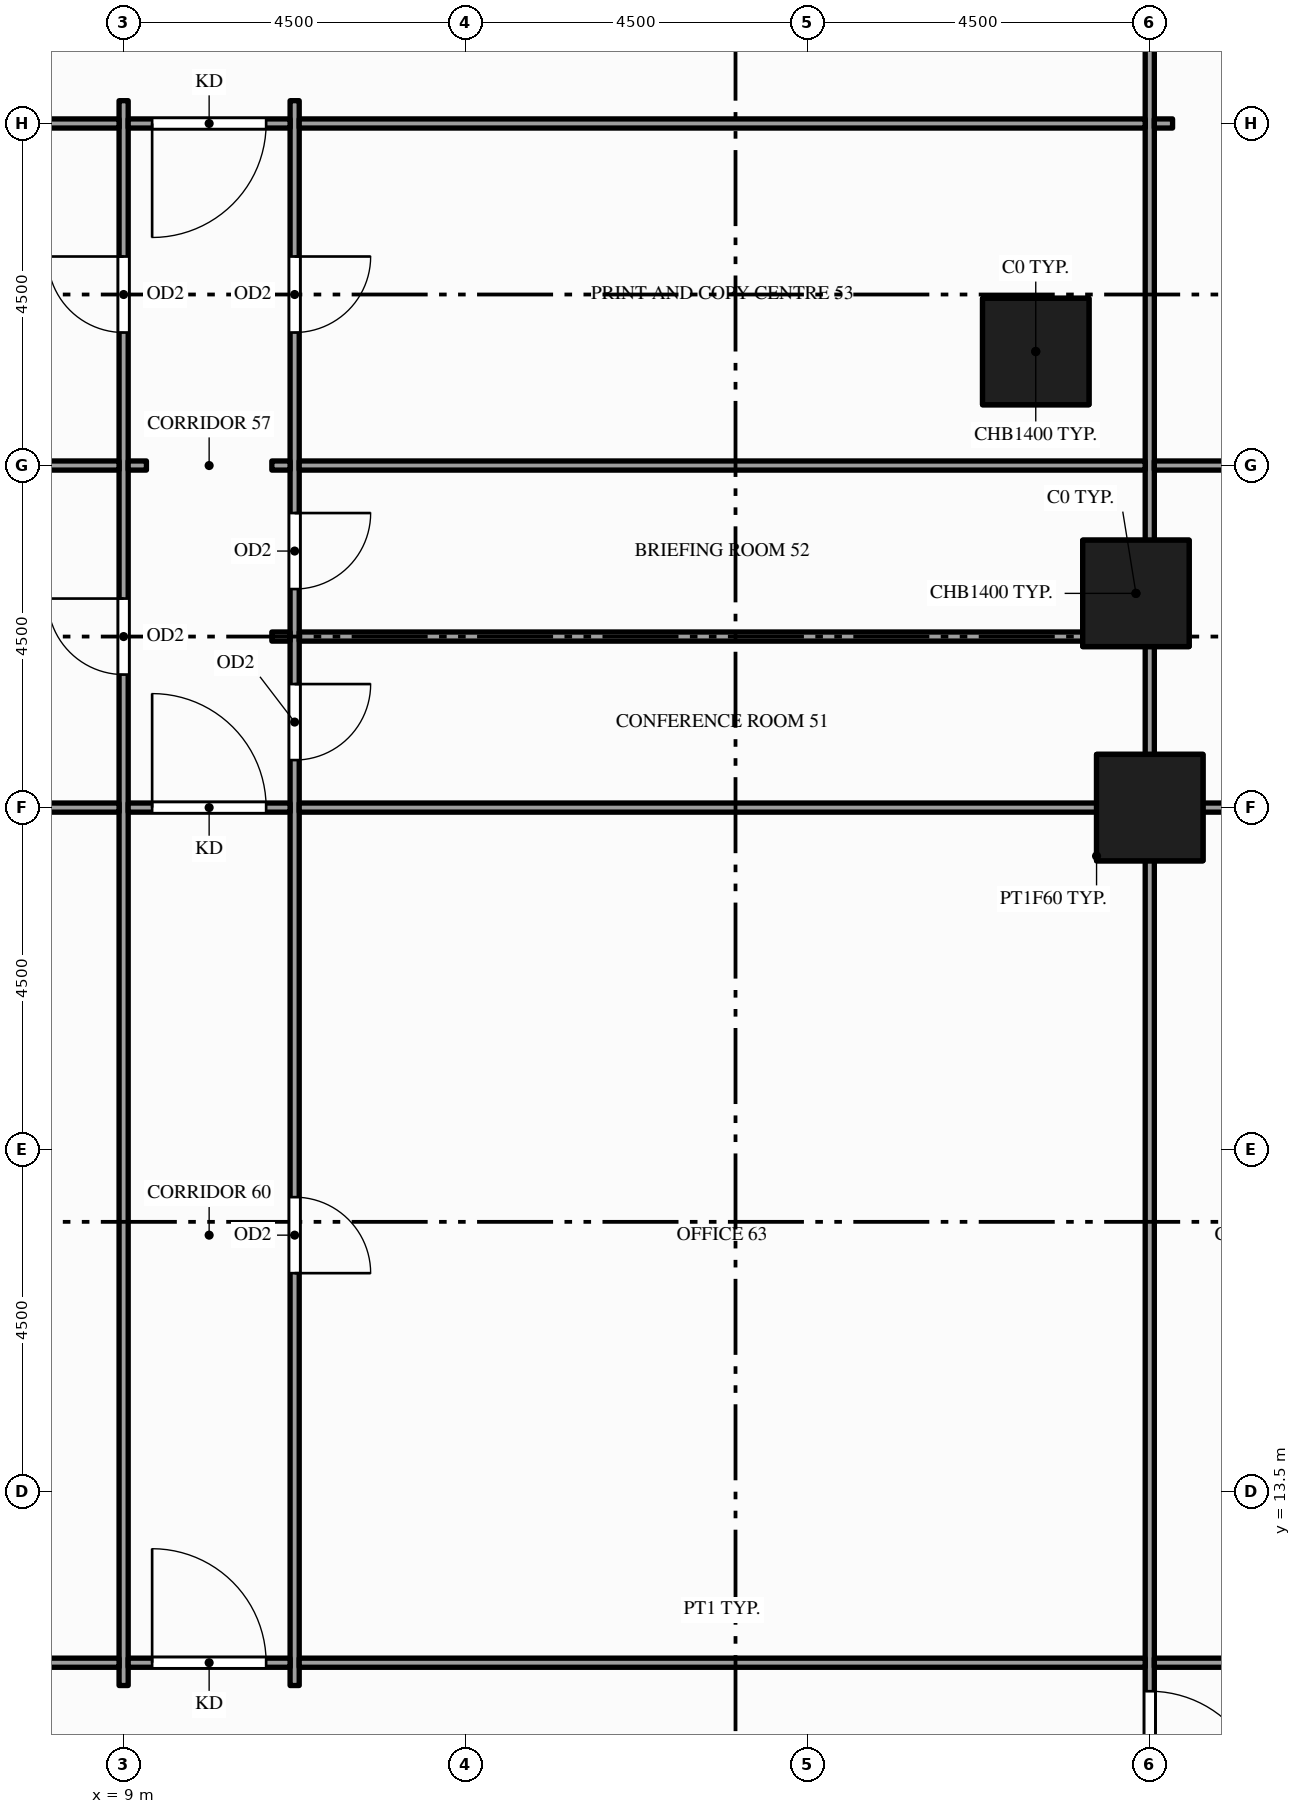
"""IFC4 building model, lengths in metres.
Left out: names, types, materials, properties, quantities, classifications, styles, units other than length and angle.
Written with IfcOpenShell. Run it as: python <this file> out.ifc"""

import sys

from ifc_helpers import new_model, si_unit, direction, frame, frame_2d, origin, origin_2d, place, context, subcontext, project, spatial, rectangle, hollow_rectangle, extrude, element, fill, save


model = new_model("IFC4")
c1 = context("Model", 3, precision=1e-05, world=origin(), true_north=direction((0.0, 1.0)))
c2 = subcontext(c1, "Body", "Model", "MODEL_VIEW")
j1 = project(units=[si_unit("LENGTHUNIT", "METRE"), si_unit("PLANEANGLEUNIT", "RADIAN")], contexts=[c1])
p1 = place(None, origin())
s1 = spatial("IfcSite", under=j1, at=p1, CompositionType="ELEMENT")
p2 = place(p1, origin())
s2 = spatial("IfcBuilding", under=s1, at=p2, CompositionType="ELEMENT")
p3 = place(p2, frame((0.0, 0.0, 24.0)))
s3 = spatial("IfcBuildingStorey", under=s2, at=p3, CompositionType="ELEMENT", Elevation=24.0)
p4 = place(p3, frame((21.0, 28.5, -0.25), z_axis=(0.0, 0.0, 1.0), x_axis=(1.0, 0.0, 0.0)))
e1 = element("IfcColumn", 1, at=p4, inside=s3, PredefinedType="COLUMN", context=c2, shape_type="SweptSolid", body=[
    extrude(hollow_rectangle(XDim=1.4, YDim=1.4, WallThickness=0.08, at=origin_2d()), origin(), (0.0, 0.0, 1.0), 3.45),
])
p5 = place(p3, frame((21.0, 28.5, 3.2), z_axis=(0.0, 0.0, 1.0), x_axis=(1.0, 0.0, 0.0)))
e2 = element("IfcColumn", 2, at=p5, inside=s3, PredefinedType="COLUMN", context=c2, shape_type="SweptSolid", body=[
    extrude(rectangle(XDim=1.4, YDim=1.4, at=origin_2d()), origin(), (0.0, 0.0, 1.0), 1.5),
])
p6 = place(p3, frame((22.318, 25.318, -0.25), z_axis=(0.0, 0.0, 1.0), x_axis=(1.0, 0.0, 0.0)))
e3 = element("IfcColumn", 3, at=p6, inside=s3, PredefinedType="COLUMN", context=c2, shape_type="SweptSolid", body=[
    extrude(hollow_rectangle(XDim=1.4, YDim=1.4, WallThickness=0.08, at=origin_2d()), origin(), (0.0, 0.0, 1.0), 3.45),
])
p7 = place(p3, frame((22.318, 25.318, 3.2), z_axis=(0.0, 0.0, 1.0), x_axis=(1.0, 0.0, 0.0)))
e4 = element("IfcColumn", 4, at=p7, inside=s3, PredefinedType="COLUMN", context=c2, shape_type="SweptSolid", body=[
    extrude(rectangle(XDim=1.4, YDim=1.4, at=origin_2d()), origin(), (0.0, 0.0, 1.0), 1.5),
])
p8 = place(p3, frame((22.5, 22.5, -0.25), z_axis=(0.0, 0.0, 1.0), x_axis=(1.0, 0.0, 0.0)))
e5 = element("IfcColumn", 5, at=p8, inside=s3, PredefinedType="COLUMN", context=c2, shape_type="SweptSolid", body=[
    extrude(hollow_rectangle(XDim=1.4, YDim=1.4, WallThickness=0.08, at=origin_2d()), origin(), (0.0, 0.0, 1.0), 3.6),
])
p9 = place(p3, frame((22.5, 22.5, 3.35), z_axis=(0.0, 0.0, 1.0), x_axis=(1.0, 0.0, 0.0)))
e6 = element("IfcColumn", 6, at=p9, inside=s3, PredefinedType="COLUMN", context=c2, shape_type="SweptSolid", body=[
    extrude(rectangle(XDim=1.4, YDim=1.4, at=origin_2d()), origin(), (0.0, 0.0, 1.0), 1.5),
])
p10 = place(p3, frame((9.0, 10.95, 0.0), z_axis=(0.0, 0.0, 1.0), x_axis=(0.0, 1.0, 0.0)))
e7 = element("IfcWall", 7, at=p10, inside=s3, PredefinedType="PARTITIONING", context=c2, shape_type="SweptSolid", body=[
    extrude(rectangle(XDim=20.85, YDim=0.12, at=frame_2d((10.425, 0.0))), origin(), (0.0, 0.0, 1.0), 3.6),
])
p11 = place(p10, frame((13.3, 0.0, 0.0)))
e8 = element("IfcOpeningElement", 8, at=p11, cuts=e7, PredefinedType="OPENING", context=c2, shape_type="SweptSolid", body=[
    extrude(rectangle(XDim=1.0, YDim=2.1, at=frame_2d((0.5, 1.05))), frame((0.0, 0.07, 0.0), z_axis=(0.0, -1.0, 0.0), x_axis=(1.0, 0.0, 0.0)), (0.0, 0.0, 1.0), 0.14),
])
p12 = place(p10, frame((17.8, 0.0, 0.0)))
e9 = element("IfcOpeningElement", 9, at=p12, cuts=e7, PredefinedType="OPENING", context=c2, shape_type="SweptSolid", body=[
    extrude(rectangle(XDim=1.0, YDim=2.1, at=frame_2d((0.5, 1.05))), frame((0.0, 0.07, 0.0), z_axis=(0.0, -1.0, 0.0), x_axis=(1.0, 0.0, 0.0)), (0.0, 0.0, 1.0), 0.14),
])
p13 = place(p3, frame((11.25, 10.95, 0.0), z_axis=(0.0, 0.0, 1.0), x_axis=(0.0, 1.0, 0.0)))
e10 = element("IfcWall", 10, at=p13, inside=s3, PredefinedType="PARTITIONING", context=c2, shape_type="SweptSolid", body=[
    extrude(rectangle(XDim=20.85, YDim=0.12, at=frame_2d((10.425, 0.0))), origin(), (0.0, 0.0, 1.0), 3.6),
])
p14 = place(p13, frame((5.425, 0.0, 0.0)))
e11 = element("IfcOpeningElement", 11, at=p14, cuts=e10, PredefinedType="OPENING", context=c2, shape_type="SweptSolid", body=[
    extrude(rectangle(XDim=1.0, YDim=2.1, at=frame_2d((0.5, 1.05))), frame((0.0, 0.07, 0.0), z_axis=(0.0, -1.0, 0.0), x_axis=(1.0, 0.0, 0.0)), (0.0, 0.0, 1.0), 0.14),
])
p15 = place(p13, frame((12.175, 0.0, 0.0)))
e12 = element("IfcOpeningElement", 12, at=p15, cuts=e10, PredefinedType="OPENING", context=c2, shape_type="SweptSolid", body=[
    extrude(rectangle(XDim=1.0, YDim=2.1, at=frame_2d((0.5, 1.05))), frame((0.0, 0.07, 0.0), z_axis=(0.0, -1.0, 0.0), x_axis=(1.0, 0.0, 0.0)), (0.0, 0.0, 1.0), 0.14),
])
p16 = place(p13, frame((14.425, 0.0, 0.0)))
e13 = element("IfcOpeningElement", 13, at=p16, cuts=e10, PredefinedType="OPENING", context=c2, shape_type="SweptSolid", body=[
    extrude(rectangle(XDim=1.0, YDim=2.1, at=frame_2d((0.5, 1.05))), frame((0.0, 0.07, 0.0), z_axis=(0.0, -1.0, 0.0), x_axis=(1.0, 0.0, 0.0)), (0.0, 0.0, 1.0), 0.14),
])
p17 = place(p13, frame((17.8, 0.0, 0.0)))
e14 = element("IfcOpeningElement", 14, at=p17, cuts=e10, PredefinedType="OPENING", context=c2, shape_type="SweptSolid", body=[
    extrude(rectangle(XDim=1.0, YDim=2.1, at=frame_2d((0.5, 1.05))), frame((0.0, 0.07, 0.0), z_axis=(0.0, -1.0, 0.0), x_axis=(1.0, 0.0, 0.0)), (0.0, 0.0, 1.0), 0.14),
])
p18 = place(p3, frame((22.5, 0.15, 0.0), z_axis=(0.0, 0.0, 1.0), x_axis=(0.0, 1.0, 0.0)))
e15 = element("IfcWall", 15, at=p18, inside=s3, PredefinedType="PARTITIONING", context=c2, shape_type="SweptSolid", body=[
    extrude(rectangle(XDim=35.95, YDim=0.12, at=frame_2d((17.975, 0.0))), origin(), (0.0, 0.0, 1.0), 3.3),
])
p19 = place(p18, frame((9.225, 0.0, 0.0)))
e16 = element("IfcOpeningElement", 16, at=p19, cuts=e15, PredefinedType="OPENING", context=c2, shape_type="SweptSolid", body=[
    extrude(rectangle(XDim=1.5, YDim=2.1, at=frame_2d((0.75, 1.05))), frame((0.0, 0.07, 0.0), z_axis=(0.0, -1.0, 0.0), x_axis=(1.0, 0.0, 0.0)), (0.0, 0.0, 1.0), 0.14),
])
p20 = place(p18, frame((32.7, 0.0, 0.0)))
e17 = element("IfcOpeningElement", 17, at=p20, cuts=e15, PredefinedType="OPENING", context=c2, shape_type="SweptSolid", body=[
    extrude(rectangle(XDim=1.8, YDim=2.1, at=frame_2d((0.9, 1.05))), frame((0.0, 0.07, 0.0), z_axis=(0.0, -1.0, 0.0), x_axis=(1.0, 0.0, 0.0)), (0.0, 0.0, 1.0), 0.14),
])
p21 = place(p3, frame((0.15, 11.25, 0.0), z_axis=(0.0, 0.0, 1.0), x_axis=(1.0, 0.0, 0.0)))
e18 = element("IfcWall", 18, at=p21, inside=s3, PredefinedType="PARTITIONING", context=c2, shape_type="SweptSolid", body=[
    extrude(rectangle(XDim=8.79, YDim=0.12, at=frame_2d((4.395, 0.0))), origin(), (0.0, 0.0, 1.0), 3.938),
])
p22 = place(p21, frame((3.905, 0.0, 0.0)))
e19 = element("IfcOpeningElement", 19, at=p22, cuts=e18, PredefinedType="OPENING", context=c2, shape_type="SweptSolid", body=[
    extrude(rectangle(XDim=1.0, YDim=2.1, at=frame_2d((0.5, 1.05))), frame((0.0, 0.07, 0.0), z_axis=(0.0, -1.0, 0.0), x_axis=(1.0, 0.0, 0.0)), (0.0, 0.0, 1.0), 0.14),
])
p23 = place(p3, frame((9.06, 11.25, 0.0), z_axis=(0.0, 0.0, 1.0), x_axis=(1.0, 0.0, 0.0)))
e20 = element("IfcWall", 20, at=p23, inside=s3, PredefinedType="PARTITIONING", context=c2, shape_type="SweptSolid", body=[
    extrude(rectangle(XDim=2.13, YDim=0.12, at=frame_2d((1.065, 0.0))), origin(), (0.0, 0.0, 1.0), 3.938),
])
p24 = place(p23, frame((0.315, 0.0, 0.0)))
e21 = element("IfcOpeningElement", 21, at=p24, cuts=e20, PredefinedType="OPENING", context=c2, shape_type="SweptSolid", body=[
    extrude(rectangle(XDim=1.5, YDim=2.1, at=frame_2d((0.75, 1.05))), frame((0.0, 0.07, 0.0), z_axis=(0.0, -1.0, 0.0), x_axis=(1.0, 0.0, 0.0)), (0.0, 0.0, 1.0), 0.14),
])
p25 = place(p3, frame((11.31, 11.25, 0.0), z_axis=(0.0, 0.0, 1.0), x_axis=(1.0, 0.0, 0.0)))
e22 = element("IfcWall", 22, at=p25, inside=s3, PredefinedType="PARTITIONING", context=c2, shape_type="SweptSolid", body=[
    extrude(rectangle(XDim=11.13, YDim=0.12, at=frame_2d((5.565, 0.0))), origin(), (0.0, 0.0, 1.0), 3.938),
])
p26 = place(p3, frame((22.56, 11.25, 0.0), z_axis=(0.0, 0.0, 1.0), x_axis=(1.0, 0.0, 0.0)))
e23 = element("IfcWall", 23, at=p26, inside=s3, PredefinedType="PARTITIONING", context=c2, shape_type="SweptSolid", body=[
    extrude(rectangle(XDim=4.38, YDim=0.12, at=frame_2d((2.19, 0.0))), origin(), (0.0, 0.0, 1.0), 3.788),
])
p27 = place(p26, frame((1.69, 0.0, 0.0)))
e24 = element("IfcOpeningElement", 24, at=p27, cuts=e23, PredefinedType="OPENING", context=c2, shape_type="SweptSolid", body=[
    extrude(rectangle(XDim=1.0, YDim=2.1, at=frame_2d((0.5, 1.05))), frame((0.0, 0.07, 0.0), z_axis=(0.0, -1.0, 0.0), x_axis=(1.0, 0.0, 0.0)), (0.0, 0.0, 1.0), 0.14),
])
p28 = place(p3, frame((0.15, 22.5, 0.0), z_axis=(0.0, 0.0, 1.0), x_axis=(1.0, 0.0, 0.0)))
e25 = element("IfcWall", 25, at=p28, inside=s3, PredefinedType="PARTITIONING", context=c2, shape_type="SweptSolid", body=[
    extrude(rectangle(XDim=8.79, YDim=0.12, at=frame_2d((4.395, 0.0))), origin(), (0.0, 0.0, 1.0), 3.6),
])
p29 = place(p3, frame((9.06, 22.5, 0.0), z_axis=(0.0, 0.0, 1.0), x_axis=(1.0, 0.0, 0.0)))
e26 = element("IfcWall", 26, at=p29, inside=s3, PredefinedType="PARTITIONING", context=c2, shape_type="SweptSolid", body=[
    extrude(rectangle(XDim=2.13, YDim=0.12, at=frame_2d((1.065, 0.0))), origin(), (0.0, 0.0, 1.0), 3.6),
])
p30 = place(p29, frame((0.315, 0.0, 0.0)))
e27 = element("IfcOpeningElement", 27, at=p30, cuts=e26, PredefinedType="OPENING", context=c2, shape_type="SweptSolid", body=[
    extrude(rectangle(XDim=1.5, YDim=2.1, at=frame_2d((0.75, 1.05))), frame((0.0, 0.07, 0.0), z_axis=(0.0, -1.0, 0.0), x_axis=(1.0, 0.0, 0.0)), (0.0, 0.0, 1.0), 0.14),
])
p31 = place(p3, frame((11.31, 22.5, 0.0), z_axis=(0.0, 0.0, 1.0), x_axis=(1.0, 0.0, 0.0)))
e28 = element("IfcWall", 28, at=p31, inside=s3, PredefinedType="PARTITIONING", context=c2, shape_type="SweptSolid", body=[
    extrude(rectangle(XDim=11.13, YDim=0.12, at=frame_2d((5.565, 0.0))), origin(), (0.0, 0.0, 1.0), 3.6),
])
p32 = place(p3, frame((22.56, 22.5, 0.0), z_axis=(0.0, 0.0, 1.0), x_axis=(1.0, 0.0, 0.0)))
e29 = element("IfcWall", 29, at=p32, inside=s3, PredefinedType="PARTITIONING", context=c2, shape_type="SweptSolid", body=[
    extrude(rectangle(XDim=4.38, YDim=0.12, at=frame_2d((2.19, 0.0))), origin(), (0.0, 0.0, 1.0), 3.788),
])
p33 = place(p3, frame((10.95, 24.75, 0.0), z_axis=(0.0, 0.0, 1.0), x_axis=(1.0, 0.0, 0.0)))
e30 = element("IfcWall", 30, at=p33, inside=s3, PredefinedType="PARTITIONING", context=c2, shape_type="SweptSolid", body=[
    extrude(rectangle(XDim=0.24, YDim=0.12, at=frame_2d((0.12, 0.0))), origin(), (0.0, 0.0, 1.0), 3.938),
])
p34 = place(p3, frame((11.31, 24.75, 0.0), z_axis=(0.0, 0.0, 1.0), x_axis=(1.0, 0.0, 0.0)))
e31 = element("IfcWall", 31, at=p34, inside=s3, PredefinedType="PARTITIONING", context=c2, shape_type="SweptSolid", body=[
    extrude(rectangle(XDim=11.13, YDim=0.12, at=frame_2d((5.565, 0.0))), origin(), (0.0, 0.0, 1.0), 3.938),
])
p35 = place(p3, frame((22.56, 24.75, 0.0), z_axis=(0.0, 0.0, 1.0), x_axis=(1.0, 0.0, 0.0)))
e32 = element("IfcWall", 32, at=p35, inside=s3, PredefinedType="PARTITIONING", context=c2, shape_type="SweptSolid", body=[
    extrude(rectangle(XDim=0.24, YDim=0.12, at=frame_2d((0.12, 0.0))), origin(), (0.0, 0.0, 1.0), 4.85),
])
p36 = place(p3, frame((0.15, 27.0, 0.0), z_axis=(0.0, 0.0, 1.0), x_axis=(1.0, 0.0, 0.0)))
e33 = element("IfcWall", 33, at=p36, inside=s3, PredefinedType="PARTITIONING", context=c2, shape_type="SweptSolid", body=[
    extrude(rectangle(XDim=8.79, YDim=0.12, at=frame_2d((4.395, 0.0))), origin(), (0.0, 0.0, 1.0), 3.938),
])
for number, where, z_axis, x_axis in (
    (34, (9.06, 27.0, 0.0), (0.0, 0.0, 1.0), (1.0, 0.0, 0.0)),
    (35, (10.95, 27.0, 0.0), (0.0, 0.0, 1.0), (1.0, 0.0, 0.0)),
):
    element("IfcWall", number, at=place(p3, frame(where, z_axis=z_axis, x_axis=x_axis)), inside=s3, PredefinedType="PARTITIONING", context=c2, shape_type="SweptSolid", body=[
        extrude(rectangle(XDim=0.24, YDim=0.12, at=frame_2d((0.12, 0.0))), origin(), (0.0, 0.0, 1.0), 3.938),
    ])
p37 = place(p3, frame((11.31, 27.0, 0.0), z_axis=(0.0, 0.0, 1.0), x_axis=(1.0, 0.0, 0.0)))
e36 = element("IfcWall", 36, at=p37, inside=s3, PredefinedType="PARTITIONING", context=c2, shape_type="SweptSolid", body=[
    extrude(rectangle(XDim=11.13, YDim=0.12, at=frame_2d((5.565, 0.0))), origin(), (0.0, 0.0, 1.0), 3.788),
])
p38 = place(p3, frame((22.56, 27.0, 0.0), z_axis=(0.0, 0.0, 1.0), x_axis=(1.0, 0.0, 0.0)))
e37 = element("IfcWall", 37, at=p38, inside=s3, PredefinedType="PARTITIONING", context=c2, shape_type="SweptSolid", body=[
    extrude(rectangle(XDim=4.38, YDim=0.12, at=frame_2d((2.19, 0.0))), origin(), (0.0, 0.0, 1.0), 3.61),
])
p39 = place(p38, frame((1.29, 0.0, 0.0)))
e38 = element("IfcOpeningElement", 38, at=p39, cuts=e37, PredefinedType="OPENING", context=c2, shape_type="SweptSolid", body=[
    extrude(rectangle(XDim=1.8, YDim=2.1, at=frame_2d((0.9, 1.05))), frame((0.0, 0.07, 0.0), z_axis=(0.0, -1.0, 0.0), x_axis=(1.0, 0.0, 0.0)), (0.0, 0.0, 1.0), 0.14),
])
p40 = place(p3, frame((0.15, 31.5, 0.0), z_axis=(0.0, 0.0, 1.0), x_axis=(1.0, 0.0, 0.0)))
e39 = element("IfcWall", 39, at=p40, inside=s3, PredefinedType="PARTITIONING", context=c2, shape_type="SweptSolid", body=[
    extrude(rectangle(XDim=8.79, YDim=0.12, at=frame_2d((4.395, 0.0))), origin(), (0.0, 0.0, 1.0), 3.938),
])
p41 = place(p3, frame((9.06, 31.5, 0.0), z_axis=(0.0, 0.0, 1.0), x_axis=(1.0, 0.0, 0.0)))
e40 = element("IfcWall", 40, at=p41, inside=s3, PredefinedType="PARTITIONING", context=c2, shape_type="SweptSolid", body=[
    extrude(rectangle(XDim=2.13, YDim=0.12, at=frame_2d((1.065, 0.0))), origin(), (0.0, 0.0, 1.0), 3.938),
])
p42 = place(p41, frame((0.315, 0.0, 0.0)))
e41 = element("IfcOpeningElement", 41, at=p42, cuts=e40, PredefinedType="OPENING", context=c2, shape_type="SweptSolid", body=[
    extrude(rectangle(XDim=1.5, YDim=2.1, at=frame_2d((0.75, 1.05))), frame((0.0, 0.07, 0.0), z_axis=(0.0, -1.0, 0.0), x_axis=(1.0, 0.0, 0.0)), (0.0, 0.0, 1.0), 0.14),
])
p43 = place(p3, frame((11.31, 31.5, 0.0), z_axis=(0.0, 0.0, 1.0), x_axis=(1.0, 0.0, 0.0)))
e42 = element("IfcWall", 42, at=p43, inside=s3, PredefinedType="PARTITIONING", context=c2, shape_type="SweptSolid", body=[
    extrude(rectangle(XDim=11.13, YDim=0.12, at=frame_2d((5.565, 0.0))), origin(), (0.0, 0.0, 1.0), 2.9),
])
p44 = place(p3, frame((22.56, 31.5, 0.0), z_axis=(0.0, 0.0, 1.0), x_axis=(1.0, 0.0, 0.0)))
e43 = element("IfcWall", 43, at=p44, inside=s3, PredefinedType="PARTITIONING", context=c2, shape_type="SweptSolid", body=[
    extrude(rectangle(XDim=0.24, YDim=0.12, at=frame_2d((0.12, 0.0))), origin(), (0.0, 0.0, 1.0), 3.788),
])
p45 = place(p19, origin())
e44 = element("IfcDoor", 44, at=p45, inside=s3, OperationType="SINGLE_SWING_LEFT", PredefinedType="DOOR", context=c2, shape_type="SweptSolid", body=[
    extrude(rectangle(XDim=1.5, YDim=2.1, at=frame_2d((0.75, 1.05))), frame((0.0, 0.025, 0.0), z_axis=(0.0, -1.0, 0.0), x_axis=(1.0, 0.0, 0.0)), (0.0, 0.0, 1.0), 0.05),
])
fill(e16, e44)
p46 = place(p24, origin())
e45 = element("IfcDoor", 45, at=p46, inside=s3, OperationType="SINGLE_SWING_LEFT", PredefinedType="DOOR", context=c2, shape_type="SweptSolid", body=[
    extrude(rectangle(XDim=1.5, YDim=2.1, at=frame_2d((0.75, 1.05))), frame((0.0, 0.025, 0.0), z_axis=(0.0, -1.0, 0.0), x_axis=(1.0, 0.0, 0.0)), (0.0, 0.0, 1.0), 0.05),
])
fill(e21, e45)
p47 = place(p14, origin())
e46 = element("IfcDoor", 46, at=p47, inside=s3, OperationType="SINGLE_SWING_LEFT", PredefinedType="DOOR", context=c2, shape_type="SweptSolid", body=[
    extrude(rectangle(XDim=1.0, YDim=2.1, at=frame_2d((0.5, 1.05))), frame((0.0, 0.025, 0.0), z_axis=(0.0, -1.0, 0.0), x_axis=(1.0, 0.0, 0.0)), (0.0, 0.0, 1.0), 0.05),
])
fill(e11, e46)
p48 = place(p30, origin())
e47 = element("IfcDoor", 47, at=p48, inside=s3, OperationType="SINGLE_SWING_LEFT", PredefinedType="DOOR", context=c2, shape_type="SweptSolid", body=[
    extrude(rectangle(XDim=1.5, YDim=2.1, at=frame_2d((0.75, 1.05))), frame((0.0, 0.025, 0.0), z_axis=(0.0, -1.0, 0.0), x_axis=(1.0, 0.0, 0.0)), (0.0, 0.0, 1.0), 0.05),
])
fill(e27, e47)
p49 = place(p42, origin())
e48 = element("IfcDoor", 48, at=p49, inside=s3, OperationType="SINGLE_SWING_LEFT", PredefinedType="DOOR", context=c2, shape_type="SweptSolid", body=[
    extrude(rectangle(XDim=1.5, YDim=2.1, at=frame_2d((0.75, 1.05))), frame((0.0, 0.025, 0.0), z_axis=(0.0, -1.0, 0.0), x_axis=(1.0, 0.0, 0.0)), (0.0, 0.0, 1.0), 0.05),
])
fill(e41, e48)
p50 = place(p11, origin())
e49 = element("IfcDoor", 49, at=p50, inside=s3, OperationType="SINGLE_SWING_RIGHT", PredefinedType="DOOR", context=c2, shape_type="SweptSolid", body=[
    extrude(rectangle(XDim=1.0, YDim=2.1, at=frame_2d((0.5, 1.05))), frame((0.0, 0.025, 0.0), z_axis=(0.0, -1.0, 0.0), x_axis=(1.0, 0.0, 0.0)), (0.0, 0.0, 1.0), 0.05),
])
fill(e8, e49)
p51 = place(p12, origin())
e50 = element("IfcDoor", 50, at=p51, inside=s3, OperationType="SINGLE_SWING_RIGHT", PredefinedType="DOOR", context=c2, shape_type="SweptSolid", body=[
    extrude(rectangle(XDim=1.0, YDim=2.1, at=frame_2d((0.5, 1.05))), frame((0.0, 0.025, 0.0), z_axis=(0.0, -1.0, 0.0), x_axis=(1.0, 0.0, 0.0)), (0.0, 0.0, 1.0), 0.05),
])
fill(e9, e50)
p52 = place(p15, origin())
e51 = element("IfcDoor", 51, at=p52, inside=s3, OperationType="SINGLE_SWING_RIGHT", PredefinedType="DOOR", context=c2, shape_type="SweptSolid", body=[
    extrude(rectangle(XDim=1.0, YDim=2.1, at=frame_2d((0.5, 1.05))), frame((0.0, 0.025, 0.0), z_axis=(0.0, -1.0, 0.0), x_axis=(1.0, 0.0, 0.0)), (0.0, 0.0, 1.0), 0.05),
])
fill(e12, e51)
p53 = place(p16, origin())
e52 = element("IfcDoor", 52, at=p53, inside=s3, OperationType="SINGLE_SWING_RIGHT", PredefinedType="DOOR", context=c2, shape_type="SweptSolid", body=[
    extrude(rectangle(XDim=1.0, YDim=2.1, at=frame_2d((0.5, 1.05))), frame((0.0, 0.025, 0.0), z_axis=(0.0, -1.0, 0.0), x_axis=(1.0, 0.0, 0.0)), (0.0, 0.0, 1.0), 0.05),
])
fill(e13, e52)
p54 = place(p17, origin())
e53 = element("IfcDoor", 53, at=p54, inside=s3, OperationType="SINGLE_SWING_RIGHT", PredefinedType="DOOR", context=c2, shape_type="SweptSolid", body=[
    extrude(rectangle(XDim=1.0, YDim=2.1, at=frame_2d((0.5, 1.05))), frame((0.0, 0.025, 0.0), z_axis=(0.0, -1.0, 0.0), x_axis=(1.0, 0.0, 0.0)), (0.0, 0.0, 1.0), 0.05),
])
fill(e14, e53)
save(model, sys.argv[1])
